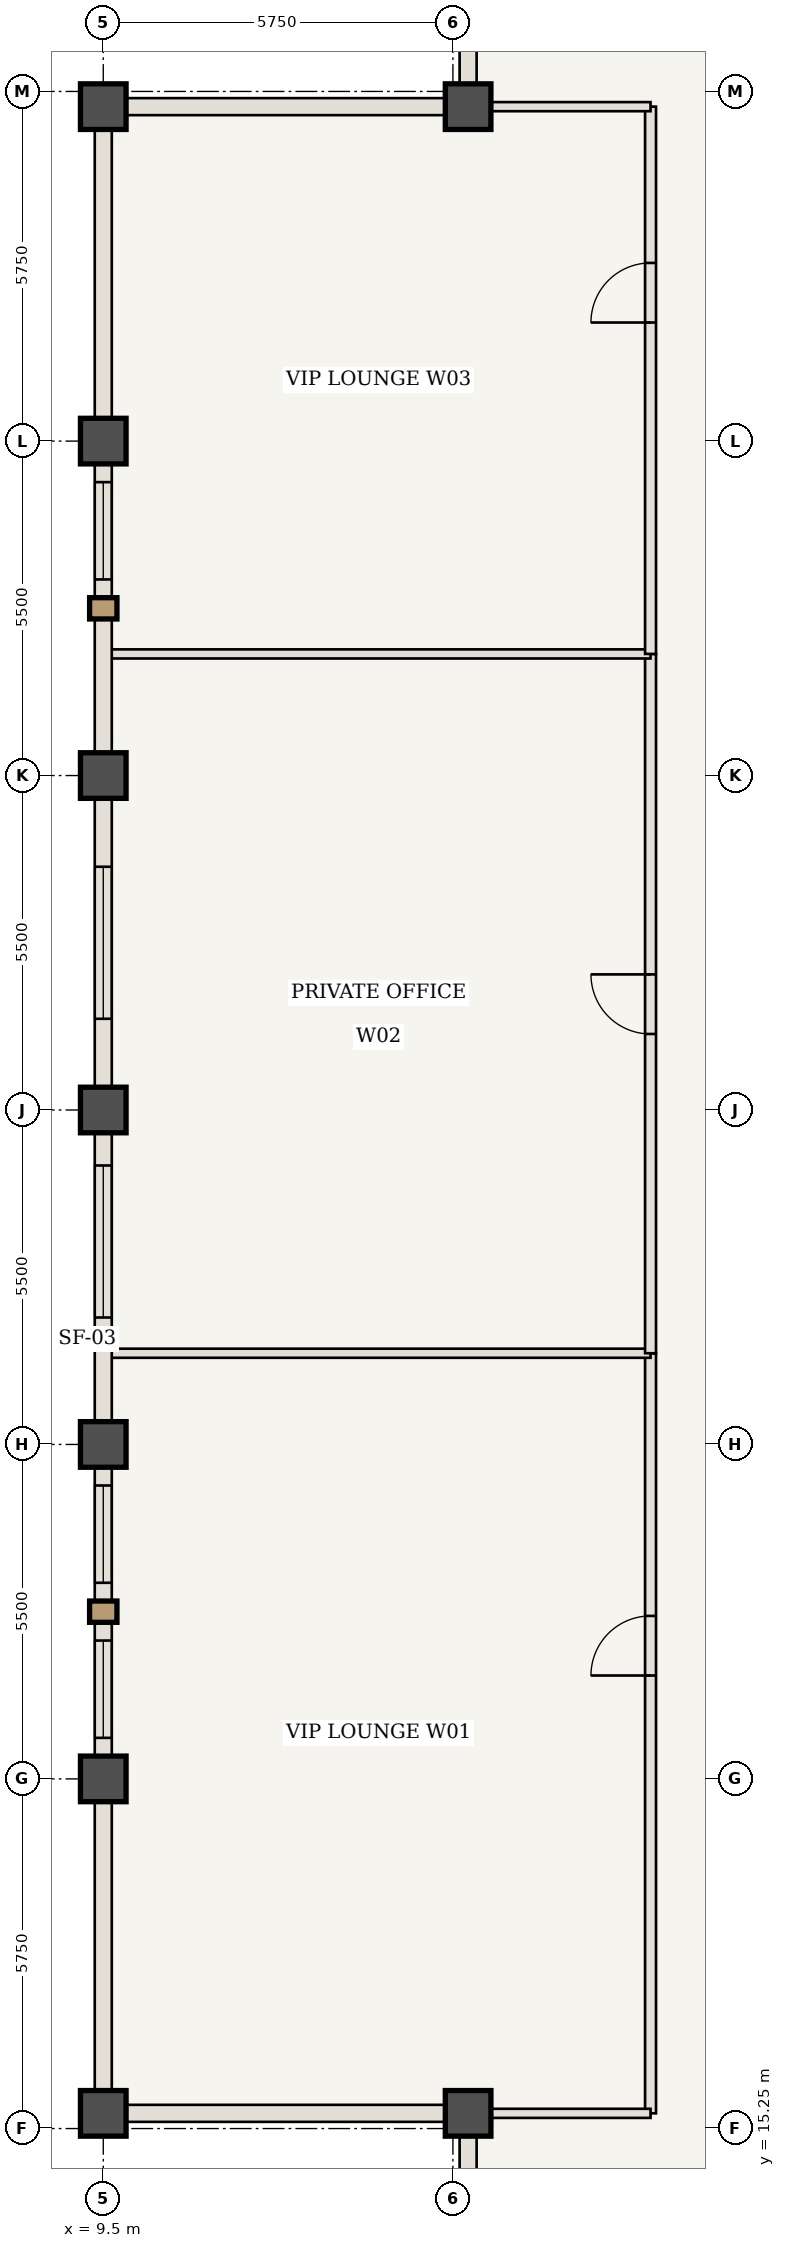
"""IFC4 building model, lengths in metres.
Left out: names, types, materials, properties, quantities, classifications, styles, units other than length and angle.
Written with IfcOpenShell. Run it as: python <this file> out.ifc"""

import sys

from ifc_helpers import new_model, si_unit, direction, frame, frame_2d, origin, origin_2d, place, context, subcontext, project, spatial, rectangle, extrude, element, fill, save


model = new_model("IFC4")
c1 = context("Model", 3, precision=1e-05, world=origin(), true_north=direction((0.0, 1.0)))
c2 = subcontext(c1, "Body", "Model", "MODEL_VIEW")
j1 = project(units=[si_unit("LENGTHUNIT", "METRE"), si_unit("PLANEANGLEUNIT", "RADIAN")], contexts=[c1])
p1 = place(None, origin())
s1 = spatial("IfcSite", under=j1, at=p1, CompositionType="ELEMENT")
p2 = place(p1, origin())
s2 = spatial("IfcBuilding", under=s1, at=p2, CompositionType="ELEMENT")
p3 = place(p2, frame((0.0, 0.0, 277.55)))
s3 = spatial("IfcBuildingStorey", under=s2, at=p3, CompositionType="ELEMENT", Elevation=277.55)
for number, where, z_axis, x_axis in (
    (1, (15.5, 15.5, 0.0), (0.0, 0.0, 1.0), (1.0, 0.0, 0.0)),
    (2, (9.5, 15.5, 0.0), (0.0, 0.0, 1.0), (1.0, 0.0, 0.0)),
    (3, (15.5, 48.5, 0.0), (0.0, 0.0, 1.0), (1.0, 0.0, 0.0)),
    (4, (9.5, 48.5, 0.0), (0.0, 0.0, 1.0), (1.0, 0.0, 0.0)),
    (5, (9.5, 21.0, 0.0), (0.0, 0.0, 1.0), (1.0, 0.0, 0.0)),
    (6, (9.5, 26.5, 0.0), (0.0, 0.0, 1.0), (1.0, 0.0, 0.0)),
    (7, (9.5, 32.0, 0.0), (0.0, 0.0, 1.0), (1.0, 0.0, 0.0)),
    (8, (9.5, 37.5, 0.0), (0.0, 0.0, 1.0), (1.0, 0.0, 0.0)),
    (9, (9.5, 43.0, 0.0), (0.0, 0.0, 1.0), (1.0, 0.0, 0.0)),
):
    element("IfcColumn", number, at=place(p3, frame(where, z_axis=z_axis, x_axis=x_axis)), inside=s3, PredefinedType="COLUMN", context=c2, shape_type="SweptSolid", body=[
        extrude(rectangle(XDim=0.75, YDim=0.75, at=origin_2d()), origin(), (0.0, 0.0, 1.0), 3.85),
    ])
p4 = place(p3, frame((18.5, 15.5, 0.0), z_axis=(0.0, 0.0, 1.0), x_axis=(0.0, 1.0, 0.0)))
e10 = element("IfcWall", 10, at=p4, inside=s3, PredefinedType="STANDARD", context=c2, shape_type="SweptSolid", body=[
    extrude(rectangle(XDim=12.5, YDim=0.18, at=frame_2d((6.25, 0.0))), origin(), (0.0, 0.0, 1.0), 3.685),
])
p5 = place(p4, frame((7.2, 0.0, 0.0)))
e11 = element("IfcOpeningElement", 11, at=p5, cuts=e10, PredefinedType="OPENING", context=c2, shape_type="SweptSolid", body=[
    extrude(rectangle(XDim=0.98, YDim=2.2, at=frame_2d((0.49, 1.1))), frame((0.0, 0.1, 0.0), z_axis=(0.0, -1.0, 0.0), x_axis=(1.0, 0.0, 0.0)), (0.0, 0.0, 1.0), 0.2),
])
p6 = place(p3, frame((9.56, 28.0, 0.0), z_axis=(0.0, 0.0, 1.0), x_axis=(1.0, 0.0, 0.0)))
e12 = element("IfcWall", 12, at=p6, inside=s3, PredefinedType="STANDARD", context=c2, shape_type="SweptSolid", body=[
    extrude(rectangle(XDim=8.94, YDim=0.15, at=frame_2d((4.47, 0.0))), origin(), (0.0, 0.0, 1.0), 3.685),
])
p7 = place(p3, frame((18.5, 28.0, 0.0), z_axis=(0.0, 0.0, 1.0), x_axis=(0.0, 1.0, 0.0)))
e13 = element("IfcWall", 13, at=p7, inside=s3, PredefinedType="STANDARD", context=c2, shape_type="SweptSolid", body=[
    extrude(rectangle(XDim=11.5, YDim=0.18, at=frame_2d((5.75, 0.0))), origin(), (0.0, 0.0, 1.0), 3.685),
])
p8 = place(p7, frame((5.25, 0.0, 0.0)))
e14 = element("IfcOpeningElement", 14, at=p8, cuts=e13, PredefinedType="OPENING", context=c2, shape_type="SweptSolid", body=[
    extrude(rectangle(XDim=0.98, YDim=2.2, at=frame_2d((0.49, 1.1))), frame((0.0, 0.1, 0.0), z_axis=(0.0, -1.0, 0.0), x_axis=(1.0, 0.0, 0.0)), (0.0, 0.0, 1.0), 0.2),
])
p9 = place(p3, frame((9.56, 39.5, 0.0), z_axis=(0.0, 0.0, 1.0), x_axis=(1.0, 0.0, 0.0)))
e15 = element("IfcWall", 15, at=p9, inside=s3, PredefinedType="STANDARD", context=c2, shape_type="SweptSolid", body=[
    extrude(rectangle(XDim=8.94, YDim=0.15, at=frame_2d((4.47, 0.0))), origin(), (0.0, 0.0, 1.0), 3.685),
])
p10 = place(p3, frame((18.5, 39.5, 0.0), z_axis=(0.0, 0.0, 1.0), x_axis=(0.0, 1.0, 0.0)))
e16 = element("IfcWall", 16, at=p10, inside=s3, PredefinedType="STANDARD", context=c2, shape_type="SweptSolid", body=[
    extrude(rectangle(XDim=9.0, YDim=0.18, at=frame_2d((4.5, 0.0))), origin(), (0.0, 0.0, 1.0), 3.685),
])
p11 = place(p10, frame((5.45, 0.0, 0.0)))
e17 = element("IfcOpeningElement", 17, at=p11, cuts=e16, PredefinedType="OPENING", context=c2, shape_type="SweptSolid", body=[
    extrude(rectangle(XDim=0.98, YDim=2.2, at=frame_2d((0.49, 1.1))), frame((0.0, 0.1, 0.0), z_axis=(0.0, -1.0, 0.0), x_axis=(1.0, 0.0, 0.0)), (0.0, 0.0, 1.0), 0.2),
])
for number, where, z_axis, x_axis in (
    (18, (15.5, 15.5, 0.0), (0.0, 0.0, 1.0), (1.0, 0.0, 0.0)),
    (19, (15.5, 48.5, 0.0), (0.0, 0.0, 1.0), (1.0, 0.0, 0.0)),
):
    element("IfcWall", number, at=place(p3, frame(where, z_axis=z_axis, x_axis=x_axis)), inside=s3, PredefinedType="STANDARD", context=c2, shape_type="SweptSolid", body=[
        extrude(rectangle(XDim=3.0, YDim=0.15, at=frame_2d((1.5, 0.0))), origin(), (0.0, 0.0, 1.0), 3.685),
    ])
p12 = place(p3, frame((9.5, 15.5, 0.0), z_axis=(0.0, 0.0, 1.0), x_axis=(0.0, 1.0, 0.0)))
e20 = element("IfcWall", 20, at=p12, inside=s3, PredefinedType="USERDEFINED", context=c2, shape_type="SweptSolid", body=[
    extrude(rectangle(XDim=5.5, YDim=0.28, at=frame_2d((2.75, 0.0))), origin(), (0.0, 0.0, 1.0), 2.985),
])
p13 = place(p3, frame((9.5, 21.0, 0.0), z_axis=(0.0, 0.0, 1.0), x_axis=(0.0, 1.0, 0.0)))
e21 = element("IfcWall", 21, at=p13, inside=s3, PredefinedType="USERDEFINED", context=c2, shape_type="SweptSolid", body=[
    extrude(rectangle(XDim=5.5, YDim=0.28, at=frame_2d((2.75, 0.0))), origin(), (0.0, 0.0, 1.0), 2.985),
])
p14 = place(p13, frame((0.675, 0.0, 0.85)))
e22 = element("IfcOpeningElement", 22, at=p14, cuts=e21, PredefinedType="OPENING", context=c2, shape_type="SweptSolid", body=[
    extrude(rectangle(XDim=1.6, YDim=1.935, at=frame_2d((0.8, 0.968))), frame((0.0, 0.15, 0.0), z_axis=(0.0, -1.0, 0.0), x_axis=(1.0, 0.0, 0.0)), (0.0, 0.0, 1.0), 0.3),
])
p15 = place(p13, frame((3.225, 0.0, 0.85)))
e23 = element("IfcOpeningElement", 23, at=p15, cuts=e21, PredefinedType="OPENING", context=c2, shape_type="SweptSolid", body=[
    extrude(rectangle(XDim=1.6, YDim=1.935, at=frame_2d((0.8, 0.968))), frame((0.0, 0.15, 0.0), z_axis=(0.0, -1.0, 0.0), x_axis=(1.0, 0.0, 0.0)), (0.0, 0.0, 1.0), 0.3),
])
p16 = place(p3, frame((9.5, 26.5, 0.0), z_axis=(0.0, 0.0, 1.0), x_axis=(0.0, 1.0, 0.0)))
e24 = element("IfcWall", 24, at=p16, inside=s3, PredefinedType="USERDEFINED", context=c2, shape_type="SweptSolid", body=[
    extrude(rectangle(XDim=5.5, YDim=0.28, at=frame_2d((2.75, 0.0))), origin(), (0.0, 0.0, 1.0), 2.985),
])
p17 = place(p16, frame((2.087, 0.0, 0.85)))
e25 = element("IfcOpeningElement", 25, at=p17, cuts=e24, PredefinedType="OPENING", context=c2, shape_type="SweptSolid", body=[
    extrude(rectangle(XDim=2.5, YDim=1.935, at=frame_2d((1.25, 0.968))), frame((0.0, 0.15, 0.0), z_axis=(0.0, -1.0, 0.0), x_axis=(1.0, 0.0, 0.0)), (0.0, 0.0, 1.0), 0.3),
])
p18 = place(p3, frame((9.5, 32.0, 0.0), z_axis=(0.0, 0.0, 1.0), x_axis=(0.0, 1.0, 0.0)))
e26 = element("IfcWall", 26, at=p18, inside=s3, PredefinedType="USERDEFINED", context=c2, shape_type="SweptSolid", body=[
    extrude(rectangle(XDim=5.5, YDim=0.28, at=frame_2d((2.75, 0.0))), origin(), (0.0, 0.0, 1.0), 2.985),
])
p19 = place(p18, frame((1.5, 0.0, 0.85)))
e27 = element("IfcOpeningElement", 27, at=p19, cuts=e26, PredefinedType="OPENING", context=c2, shape_type="SweptSolid", body=[
    extrude(rectangle(XDim=2.5, YDim=1.935, at=frame_2d((1.25, 0.968))), frame((0.0, 0.15, 0.0), z_axis=(0.0, -1.0, 0.0), x_axis=(1.0, 0.0, 0.0)), (0.0, 0.0, 1.0), 0.3),
])
p20 = place(p3, frame((9.5, 37.5, 0.0), z_axis=(0.0, 0.0, 1.0), x_axis=(0.0, 1.0, 0.0)))
e28 = element("IfcWall", 28, at=p20, inside=s3, PredefinedType="USERDEFINED", context=c2, shape_type="SweptSolid", body=[
    extrude(rectangle(XDim=5.5, YDim=0.28, at=frame_2d((2.75, 0.0))), origin(), (0.0, 0.0, 1.0), 2.985),
])
p21 = place(p20, frame((3.225, 0.0, 0.85)))
e29 = element("IfcOpeningElement", 29, at=p21, cuts=e28, PredefinedType="OPENING", context=c2, shape_type="SweptSolid", body=[
    extrude(rectangle(XDim=1.6, YDim=1.935, at=frame_2d((0.8, 0.968))), frame((0.0, 0.15, 0.0), z_axis=(0.0, -1.0, 0.0), x_axis=(1.0, 0.0, 0.0)), (0.0, 0.0, 1.0), 0.3),
])
p22 = place(p3, frame((9.5, 43.0, 0.0), z_axis=(0.0, 0.0, 1.0), x_axis=(0.0, 1.0, 0.0)))
e30 = element("IfcWall", 30, at=p22, inside=s3, PredefinedType="USERDEFINED", context=c2, shape_type="SweptSolid", body=[
    extrude(rectangle(XDim=5.5, YDim=0.28, at=frame_2d((2.75, 0.0))), origin(), (0.0, 0.0, 1.0), 2.985),
])
for number, where, z_axis, x_axis in (
    (31, (15.5, 9.5, 0.0), (0.0, 0.0, 1.0), (0.0, 1.0, 0.0)),
    (32, (15.5, 15.5, 0.0), (0.0, 0.0, 1.0), (-1.0, 0.0, 0.0)),
    (33, (15.5, 48.5, 0.0), (0.0, 0.0, 1.0), (0.0, 1.0, 0.0)),
    (34, (9.5, 48.5, 0.0), (0.0, 0.0, 1.0), (1.0, 0.0, 0.0)),
):
    element("IfcWall", number, at=place(p3, frame(where, z_axis=z_axis, x_axis=x_axis)), inside=s3, PredefinedType="USERDEFINED", context=c2, shape_type="SweptSolid", body=[
        extrude(rectangle(XDim=6.0, YDim=0.28, at=frame_2d((3.0, 0.0))), origin(), (0.0, 0.0, 1.0), 2.985),
    ])
p23 = place(p5, origin())
e35 = element("IfcDoor", 35, at=p23, inside=s3, OperationType="SINGLE_SWING_LEFT", PredefinedType="DOOR", context=c2, shape_type="SweptSolid", body=[
    extrude(rectangle(XDim=0.98, YDim=2.2, at=frame_2d((0.49, 1.1))), frame((0.0, 0.025, 0.0), z_axis=(0.0, -1.0, 0.0), x_axis=(1.0, 0.0, 0.0)), (0.0, 0.0, 1.0), 0.05),
])
fill(e11, e35)
p24 = place(p8, origin())
e36 = element("IfcDoor", 36, at=p24, inside=s3, OperationType="SINGLE_SWING_RIGHT", PredefinedType="DOOR", context=c2, shape_type="SweptSolid", body=[
    extrude(rectangle(XDim=0.98, YDim=2.2, at=frame_2d((0.49, 1.1))), frame((0.0, 0.025, 0.0), z_axis=(0.0, -1.0, 0.0), x_axis=(1.0, 0.0, 0.0)), (0.0, 0.0, 1.0), 0.05),
])
fill(e14, e36)
p25 = place(p11, origin())
e37 = element("IfcDoor", 37, at=p25, inside=s3, OperationType="SINGLE_SWING_LEFT", PredefinedType="DOOR", context=c2, shape_type="SweptSolid", body=[
    extrude(rectangle(XDim=0.98, YDim=2.2, at=frame_2d((0.49, 1.1))), frame((0.0, 0.025, 0.0), z_axis=(0.0, -1.0, 0.0), x_axis=(1.0, 0.0, 0.0)), (0.0, 0.0, 1.0), 0.05),
])
fill(e17, e37)
p26 = place(p14, origin())
e38 = element("IfcWindow", 38, at=p26, inside=s3, PartitioningType="SINGLE_PANEL", PredefinedType="WINDOW", context=c2, shape_type="SweptSolid", body=[
    extrude(rectangle(XDim=1.6, YDim=1.935, at=frame_2d((0.8, 0.968))), frame((0.0, 0.03, 0.0), z_axis=(0.0, -1.0, 0.0), x_axis=(1.0, 0.0, 0.0)), (0.0, 0.0, 1.0), 0.06),
])
fill(e22, e38)
p27 = place(p15, origin())
e39 = element("IfcWindow", 39, at=p27, inside=s3, PartitioningType="SINGLE_PANEL", PredefinedType="WINDOW", context=c2, shape_type="SweptSolid", body=[
    extrude(rectangle(XDim=1.6, YDim=1.935, at=frame_2d((0.8, 0.968))), frame((0.0, 0.03, 0.0), z_axis=(0.0, -1.0, 0.0), x_axis=(1.0, 0.0, 0.0)), (0.0, 0.0, 1.0), 0.06),
])
fill(e23, e39)
p28 = place(p17, origin())
e40 = element("IfcWindow", 40, at=p28, inside=s3, PartitioningType="SINGLE_PANEL", PredefinedType="WINDOW", context=c2, shape_type="SweptSolid", body=[
    extrude(rectangle(XDim=2.5, YDim=1.935, at=frame_2d((1.25, 0.968))), frame((0.0, 0.03, 0.0), z_axis=(0.0, -1.0, 0.0), x_axis=(1.0, 0.0, 0.0)), (0.0, 0.0, 1.0), 0.06),
])
fill(e25, e40)
p29 = place(p19, origin())
e41 = element("IfcWindow", 41, at=p29, inside=s3, PartitioningType="SINGLE_PANEL", PredefinedType="WINDOW", context=c2, shape_type="SweptSolid", body=[
    extrude(rectangle(XDim=2.5, YDim=1.935, at=frame_2d((1.25, 0.968))), frame((0.0, 0.03, 0.0), z_axis=(0.0, -1.0, 0.0), x_axis=(1.0, 0.0, 0.0)), (0.0, 0.0, 1.0), 0.06),
])
fill(e27, e41)
p30 = place(p21, origin())
e42 = element("IfcWindow", 42, at=p30, inside=s3, PartitioningType="SINGLE_PANEL", PredefinedType="WINDOW", context=c2, shape_type="SweptSolid", body=[
    extrude(rectangle(XDim=1.6, YDim=1.935, at=frame_2d((0.8, 0.968))), frame((0.0, 0.03, 0.0), z_axis=(0.0, -1.0, 0.0), x_axis=(1.0, 0.0, 0.0)), (0.0, 0.0, 1.0), 0.06),
])
fill(e29, e42)
save(model, sys.argv[1])
